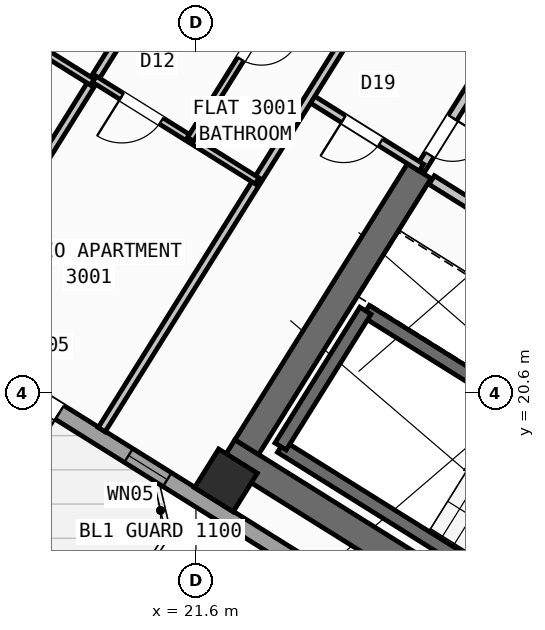
"""IFC4 building model, lengths in metres.
Left out: names, types, materials, properties, quantities, classifications, styles, units other than length and angle.
Written with IfcOpenShell. Run it as: python <this file> out.ifc"""

import sys

from ifc_helpers import new_model, si_unit, direction, frame, frame_2d, origin, origin_2d, place, context, subcontext, project, spatial, rectangle, hollow_rectangle, extrude, source, transform, mapped, element, fill, save


model = new_model("IFC4")
c1 = context("Model", 3, precision=1e-05, world=origin(), true_north=direction((0.0, 1.0)))
c2 = subcontext(c1, "Body", "Model", "MODEL_VIEW")
j1 = project(units=[si_unit("LENGTHUNIT", "METRE"), si_unit("PLANEANGLEUNIT", "RADIAN")], contexts=[c1])
p1 = place(None, origin())
s1 = spatial("IfcSite", under=j1, at=p1, CompositionType="ELEMENT")
p2 = place(p1, origin())
s2 = spatial("IfcBuilding", under=s1, at=p2, CompositionType="ELEMENT")
p3 = place(p2, frame((0.0, 0.0, 119.7)))
s3 = spatial("IfcBuildingStorey", under=s2, at=p3, CompositionType="ELEMENT", Elevation=119.7)
p4 = place(p3, frame((33.366, 12.477, 0.0), z_axis=(0.0, 0.0, 1.0), x_axis=(-0.848047359947, 0.529920442413, 0.0)))
e1 = element("IfcWall", 1, at=p4, inside=s3, PredefinedType="SHEAR", context=c2, shape_type="SweptSolid", body=[
    extrude(rectangle(XDim=13.14, YDim=0.55, at=frame_2d((6.57, 0.0))), origin(), (0.0, 0.0, 1.0), 3.35),
])
p5 = place(p3, frame((26.007, 24.976, 0.0), z_axis=(0.0, 0.0, 1.0), x_axis=(-0.529923795287, -0.848045264823, 0.0)))
e2 = element("IfcWall", 2, at=p5, inside=s3, PredefinedType="SHEAR", context=c2, shape_type="SweptSolid", body=[
    extrude(rectangle(XDim=6.425, YDim=0.55, at=frame_2d((3.212, 0.0))), origin(), (0.0, 0.0, 1.0), 3.35),
])
m1 = source(origin(), c2, "Body", "SweptSolid", [
    extrude(hollow_rectangle(XDim=0.9, YDim=0.9, WallThickness=0.036, at=origin_2d()), origin(), (0.0, 0.0, 1.0), 3.6),
])
p6 = place(p3, frame((22.191, 18.87, 0.0), z_axis=(0.0, 0.0, 1.0), x_axis=(-0.848048096156, 0.529919264233, 0.0)))
e3 = element("IfcColumn", 3, at=p6, inside=s3, PredefinedType="COLUMN", context=c2, shape_type="MappedRepresentation", body=[
    mapped(m1, transform((0.0, 0.0, 0.0), scale=1.0)),
])
p7 = place(p3, frame((31.76, 12.183, 0.0), z_axis=(0.0, 0.0, 1.0), x_axis=(-0.848047074256, 0.529920899612, 0.0)))
e4 = element("IfcWall", 4, at=p7, inside=s3, PredefinedType="STANDARD", context=c2, shape_type="SweptSolid", body=[
    extrude(rectangle(XDim=30.652, YDim=0.32, at=frame_2d((15.326, 0.0))), origin(), (0.0, 0.0, 1.0), 3.35),
])
p8 = place(p7, frame((15.153, 0.0, 0.0)))
e5 = element("IfcOpeningElement", 5, at=p8, cuts=e4, PredefinedType="OPENING", context=c2, shape_type="SweptSolid", body=[
    extrude(rectangle(XDim=1.2, YDim=2.15, at=frame_2d((0.6, 1.075))), frame((0.0, 0.17, 0.0), z_axis=(0.0, -1.0, 0.0), x_axis=(1.0, 0.0, 0.0)), (0.0, 0.0, 1.0), 0.34),
])
p9 = place(p7, frame((2.002, 0.0, 0.8)))
e6 = element("IfcOpeningElement", 6, at=p9, cuts=e4, PredefinedType="OPENING", context=c2, shape_type="SweptSolid", body=[
    extrude(rectangle(XDim=2.1, YDim=1.55, at=frame_2d((1.05, 0.775))), frame((0.0, 0.17, 0.0), z_axis=(0.0, -1.0, 0.0), x_axis=(1.0, 0.0, 0.0)), (0.0, 0.0, 1.0), 0.34),
])
p10 = place(p7, frame((7.206, 0.0, 0.8)))
e7 = element("IfcOpeningElement", 7, at=p10, cuts=e4, PredefinedType="OPENING", context=c2, shape_type="SweptSolid", body=[
    extrude(rectangle(XDim=2.1, YDim=1.55, at=frame_2d((1.05, 0.775))), frame((0.0, 0.17, 0.0), z_axis=(0.0, -1.0, 0.0), x_axis=(1.0, 0.0, 0.0)), (0.0, 0.0, 1.0), 0.34),
])
p11 = place(p7, frame((12.648, 0.0, 1.0)))
e8 = element("IfcOpeningElement", 8, at=p11, cuts=e4, PredefinedType="OPENING", context=c2, shape_type="SweptSolid", body=[
    extrude(rectangle(XDim=0.9, YDim=1.25, at=frame_2d((0.45, 0.625))), frame((0.0, 0.17, 0.0), z_axis=(0.0, -1.0, 0.0), x_axis=(1.0, 0.0, 0.0)), (0.0, 0.0, 1.0), 0.34),
])
p12 = place(p7, frame((19.458, 0.0, 0.95)))
e9 = element("IfcOpeningElement", 9, at=p12, cuts=e4, PredefinedType="OPENING", context=c2, shape_type="SweptSolid", body=[
    extrude(rectangle(XDim=1.2, YDim=1.4, at=frame_2d((0.6, 0.7))), frame((0.0, 0.17, 0.0), z_axis=(0.0, -1.0, 0.0), x_axis=(1.0, 0.0, 0.0)), (0.0, 0.0, 1.0), 0.34),
])
p13 = place(p7, frame((21.858, 0.0, 0.95)))
e10 = element("IfcOpeningElement", 10, at=p13, cuts=e4, PredefinedType="OPENING", context=c2, shape_type="SweptSolid", body=[
    extrude(rectangle(XDim=1.2, YDim=1.4, at=frame_2d((0.6, 0.7))), frame((0.0, 0.17, 0.0), z_axis=(0.0, -1.0, 0.0), x_axis=(1.0, 0.0, 0.0)), (0.0, 0.0, 1.0), 0.34),
])
p14 = place(p7, frame((27.266, 0.0, 0.8)))
e11 = element("IfcOpeningElement", 11, at=p14, cuts=e4, PredefinedType="OPENING", context=c2, shape_type="SweptSolid", body=[
    extrude(rectangle(XDim=2.1, YDim=1.55, at=frame_2d((1.05, 0.775))), frame((0.0, 0.17, 0.0), z_axis=(0.0, -1.0, 0.0), x_axis=(1.0, 0.0, 0.0)), (0.0, 0.0, 1.0), 0.34),
])
p15 = place(p3, frame((29.605, 15.581, 0.0), z_axis=(0.0, 0.0, 1.0), x_axis=(-0.848036911448, 0.529937163087, 0.0)))
e12 = element("IfcWall", 12, at=p15, inside=s3, PredefinedType="SHEAR", context=c2, shape_type="SweptSolid", body=[
    extrude(rectangle(XDim=7.46, YDim=0.26, at=frame_2d((3.73, 0.0))), origin(), (0.0, 0.0, 1.0), 3.35),
])
p16 = place(p3, frame((31.28, 18.261, 0.0), z_axis=(0.0, 0.0, 1.0), x_axis=(-0.848051618787, 0.529913626805, 0.0)))
e13 = element("IfcWall", 13, at=p16, inside=s3, PredefinedType="SHEAR", context=c2, shape_type="SweptSolid", body=[
    extrude(rectangle(XDim=7.46, YDim=0.26, at=frame_2d((3.73, 0.0))), origin(), (0.0, 0.0, 1.0), 3.35),
])
p17 = place(p16, frame((0.36, 0.0, 0.0)))
e14 = element("IfcOpeningElement", 14, at=p17, cuts=e13, PredefinedType="OPENING", context=c2, shape_type="SweptSolid", body=[
    extrude(rectangle(XDim=0.86, YDim=2.05, at=frame_2d((0.43, 1.025))), frame((0.0, 0.14, 0.0), z_axis=(0.0, -1.0, 0.0), x_axis=(1.0, 0.0, 0.0)), (0.0, 0.0, 1.0), 0.28),
])
p18 = place(p3, frame((24.945, 22.22, 0.0), z_axis=(0.0, 0.0, 1.0), x_axis=(-0.529908658664, -0.84805472316, 0.0)))
e15 = element("IfcWall", 15, at=p18, inside=s3, PredefinedType="SHEAR", context=c2, shape_type="SweptSolid", body=[
    extrude(rectangle(XDim=3.16, YDim=0.26, at=frame_2d((1.58, 0.0))), origin(), (0.0, 0.0, 1.0), 3.35),
])
p19 = place(p3, frame((31.525, 21.504, 0.0), z_axis=(0.0, 0.0, 1.0), x_axis=(-0.848040211232, 0.529931882541, 0.0)))
e16 = element("IfcWall", 16, at=p19, inside=s3, PredefinedType="STANDARD", context=c2, shape_type="SweptSolid", body=[
    extrude(rectangle(XDim=6.218, YDim=0.2, at=frame_2d((3.109, 0.0))), origin(), (0.0, 0.0, 1.0), 3.34),
])
p20 = place(p19, frame((4.4, 0.0, 0.0)))
e17 = element("IfcOpeningElement", 17, at=p20, cuts=e16, PredefinedType="OPENING", context=c2, shape_type="SweptSolid", body=[
    extrude(rectangle(XDim=0.86, YDim=2.05, at=frame_2d((0.43, 1.025))), frame((0.0, 0.11, 0.0), z_axis=(0.0, -1.0, 0.0), x_axis=(1.0, 0.0, 0.0)), (0.0, 0.0, 1.0), 0.22),
])
p21 = place(p19, frame((1.45, 0.0, 0.0)))
e18 = element("IfcOpeningElement", 18, at=p21, cuts=e16, PredefinedType="OPENING", context=c2, shape_type="SweptSolid", body=[
    extrude(rectangle(XDim=0.86, YDim=2.05, at=frame_2d((0.43, 1.025))), frame((0.0, 0.11, 0.0), z_axis=(0.0, -1.0, 0.0), x_axis=(1.0, 0.0, 0.0)), (0.0, 0.0, 1.0), 0.22),
])
p22 = place(p3, frame((27.596, 27.52, 0.0), z_axis=(0.0, 0.0, 1.0), x_axis=(-0.529865479138, -0.848081702443, 0.0)))
e19 = element("IfcWall", 19, at=p22, inside=s3, PredefinedType="STANDARD", context=c2, shape_type="SweptSolid", body=[
    extrude(rectangle(XDim=2.96, YDim=0.2, at=frame_2d((1.48, 0.0))), origin(), (0.0, 0.0, 1.0), 3.34),
])
p23 = place(p22, frame((1.76, 0.0, 0.0)))
e20 = element("IfcOpeningElement", 20, at=p23, cuts=e19, PredefinedType="OPENING", context=c2, shape_type="SweptSolid", body=[
    extrude(rectangle(XDim=0.86, YDim=2.05, at=frame_2d((0.43, 1.025))), frame((0.0, 0.11, 0.0), z_axis=(0.0, -1.0, 0.0), x_axis=(1.0, 0.0, 0.0)), (0.0, 0.0, 1.0), 0.22),
])
p24 = place(p3, frame((26.049, 25.044, 0.0), z_axis=(0.0, 0.0, 1.0), x_axis=(-0.848050851465, 0.529914854792, 0.0)))
e21 = element("IfcWall", 21, at=p24, inside=s3, PredefinedType="PARTITIONING", context=c2, shape_type="SweptSolid", body=[
    extrude(rectangle(XDim=2.61, YDim=0.16, at=frame_2d((1.305, 0.0))), origin(), (0.0, 0.0, 1.0), 2.775),
])
p25 = place(p24, frame((0.95, 0.0, 0.0)))
e22 = element("IfcOpeningElement", 22, at=p25, cuts=e21, PredefinedType="OPENING", context=c2, shape_type="SweptSolid", body=[
    extrude(rectangle(XDim=0.86, YDim=2.05, at=frame_2d((0.43, 1.025))), frame((0.0, 0.09, 0.0), z_axis=(0.0, -1.0, 0.0), x_axis=(1.0, 0.0, 0.0)), (0.0, 0.0, 1.0), 0.18),
])
p26 = place(p3, frame((25.198, 28.606, 0.0), z_axis=(0.0, 0.0, 1.0), x_axis=(-0.529926497642, -0.848043576178, 0.0)))
e23 = element("IfcWall", 23, at=p26, inside=s3, PredefinedType="PARTITIONING", context=c2, shape_type="SweptSolid", body=[
    extrude(rectangle(XDim=10.3, YDim=0.16, at=frame_2d((5.15, 0.0))), origin(), (0.0, 0.0, 1.0), 3.34),
])
p27 = place(p3, frame((20.387, 28.06, 0.0), z_axis=(0.0, 0.0, 1.0), x_axis=(-0.529902564924, -0.848058530814, 0.0)))
e24 = element("IfcWall", 24, at=p27, inside=s3, PredefinedType="PARTITIONING", context=c2, shape_type="SweptSolid", body=[
    extrude(rectangle(XDim=6.376, YDim=0.16, at=frame_2d((3.188, 0.0))), origin(), (0.0, 0.0, 1.0), 2.775),
])
p28 = place(p3, frame((22.807, 24.781, 0.0), z_axis=(0.0, 0.0, 1.0), x_axis=(-0.84803087207, 0.529946827537, 0.0)))
e25 = element("IfcWall", 25, at=p28, inside=s3, PredefinedType="PLUMBINGWALL", context=c2, shape_type="SweptSolid", body=[
    extrude(rectangle(XDim=3.79, YDim=0.14, at=frame_2d((1.895, 0.0))), origin(), (0.0, 0.0, 1.0), 3.34),
])
p29 = place(p28, frame((2.23, 0.0, 0.0)))
e26 = element("IfcOpeningElement", 26, at=p29, cuts=e25, PredefinedType="OPENING", context=c2, shape_type="SweptSolid", body=[
    extrude(rectangle(XDim=0.92, YDim=2.08, at=frame_2d((0.46, 1.04))), frame((0.0, 0.08, 0.0), z_axis=(0.0, -1.0, 0.0), x_axis=(1.0, 0.0, 0.0)), (0.0, 0.0, 1.0), 0.16),
])
p30 = place(p3, frame((23.883, 29.427, 0.0), z_axis=(0.0, 0.0, 1.0), x_axis=(-0.529950281337, -0.84802871373, 0.0)))
e27 = element("IfcWall", 27, at=p30, inside=s3, PredefinedType="PLUMBINGWALL", context=c2, shape_type="SweptSolid", body=[
    extrude(rectangle(XDim=4.51, YDim=0.14, at=frame_2d((2.255, 0.0))), origin(), (0.0, 0.0, 1.0), 2.995),
])
p31 = place(p30, frame((1.865, 0.0, 0.0)))
e28 = element("IfcOpeningElement", 28, at=p31, cuts=e27, PredefinedType="OPENING", context=c2, shape_type="SweptSolid", body=[
    extrude(rectangle(XDim=0.78, YDim=2.05, at=frame_2d((0.39, 1.025))), frame((0.0, 0.08, 0.0), z_axis=(0.0, -1.0, 0.0), x_axis=(1.0, 0.0, 0.0)), (0.0, 0.0, 1.0), 0.16),
])
p32 = place(p3, frame((19.556, 26.73, 0.0), z_axis=(0.0, 0.0, 1.0), x_axis=(-0.848043949058, 0.52992590092, 0.0)))
e29 = element("IfcWall", 29, at=p32, inside=s3, PredefinedType="PLUMBINGWALL", context=c2, shape_type="SweptSolid", body=[
    extrude(rectangle(XDim=12.92, YDim=0.14, at=frame_2d((6.46, 0.0))), origin(), (0.0, 0.0, 1.0), 3.34),
])
p33 = place(p32, frame((5.849, 0.0, 0.0)))
e30 = element("IfcOpeningElement", 30, at=p33, cuts=e29, PredefinedType="OPENING", context=c2, shape_type="SweptSolid", body=[
    extrude(rectangle(XDim=0.92, YDim=2.08, at=frame_2d((0.46, 1.04))), frame((0.0, 0.08, 0.0), z_axis=(0.0, -1.0, 0.0), x_axis=(1.0, 0.0, 0.0)), (0.0, 0.0, 1.0), 0.16),
])
m2 = source(origin(), c2, "Body", "SweptSolid", [
    extrude(rectangle(XDim=1.2, YDim=2.15, at=frame_2d((0.6, 1.075))), frame((0.0, 0.025, 0.0), z_axis=(0.0, -1.0, 0.0), x_axis=(1.0, 0.0, 0.0)), (0.0, 0.0, 1.0), 0.05),
])
p34 = place(p8, origin())
e31 = element("IfcDoor", 31, at=p34, inside=s3, OperationType="SINGLE_SWING_LEFT", PredefinedType="DOOR", context=c2, shape_type="MappedRepresentation", body=[
    mapped(m2, transform((0.0, 0.0, 0.0), scale=1.0)),
])
fill(e5, e31)
m3 = source(origin(), c2, "Body", "SweptSolid", [
    extrude(rectangle(XDim=0.9, YDim=1.25, at=frame_2d((0.45, 0.625))), frame((0.0, 0.03, 0.0), z_axis=(0.0, -1.0, 0.0), x_axis=(1.0, 0.0, 0.0)), (0.0, 0.0, 1.0), 0.06),
])
p35 = place(p11, origin())
e32 = element("IfcWindow", 32, at=p35, inside=s3, PartitioningType="SINGLE_PANEL", PredefinedType="WINDOW", context=c2, shape_type="MappedRepresentation", body=[
    mapped(m3, transform((0.0, 0.0, 0.0), scale=1.0)),
])
fill(e8, e32)
m4 = source(origin(), c2, "Body", "SweptSolid", [
    extrude(rectangle(XDim=0.86, YDim=2.05, at=frame_2d((0.43, 1.025))), frame((0.0, 0.025, 0.0), z_axis=(0.0, -1.0, 0.0), x_axis=(1.0, 0.0, 0.0)), (0.0, 0.0, 1.0), 0.05),
])
p36 = place(p25, origin())
e33 = element("IfcDoor", 33, at=p36, inside=s3, OperationType="SINGLE_SWING_RIGHT", PredefinedType="DOOR", context=c2, shape_type="MappedRepresentation", body=[
    mapped(m4, transform((0.0, 0.0, 0.0), scale=1.0)),
])
fill(e22, e33)
p37 = place(p23, origin())
e34 = element("IfcDoor", 34, at=p37, inside=s3, OperationType="SINGLE_SWING_LEFT", PredefinedType="DOOR", context=c2, shape_type="MappedRepresentation", body=[
    mapped(m4, transform((0.0, 0.0, 0.0), scale=1.0)),
])
fill(e20, e34)
m5 = source(origin(), c2, "Body", "SweptSolid", [
    extrude(rectangle(XDim=0.92, YDim=2.08, at=frame_2d((0.46, 1.04))), frame((0.0, 0.025, 0.0), z_axis=(0.0, -1.0, 0.0), x_axis=(1.0, 0.0, 0.0)), (0.0, 0.0, 1.0), 0.05),
])
p38 = place(p29, origin())
e35 = element("IfcDoor", 35, at=p38, inside=s3, OperationType="SINGLE_SWING_RIGHT", PredefinedType="DOOR", context=c2, shape_type="MappedRepresentation", body=[
    mapped(m5, transform((0.0, 0.0, 0.0), scale=1.0)),
])
fill(e26, e35)
m6 = source(origin(), c2, "Body", "SweptSolid", [
    extrude(rectangle(XDim=0.78, YDim=2.05, at=frame_2d((0.39, 1.025))), frame((0.0, 0.025, 0.0), z_axis=(0.0, -1.0, 0.0), x_axis=(1.0, 0.0, 0.0)), (0.0, 0.0, 1.0), 0.05),
])
p39 = place(p31, origin())
e36 = element("IfcDoor", 36, at=p39, inside=s3, OperationType="SINGLE_SWING_LEFT", PredefinedType="DOOR", context=c2, shape_type="MappedRepresentation", body=[
    mapped(m6, transform((0.0, 0.0, 0.0), scale=1.0)),
])
fill(e28, e36)
save(model, sys.argv[1])
